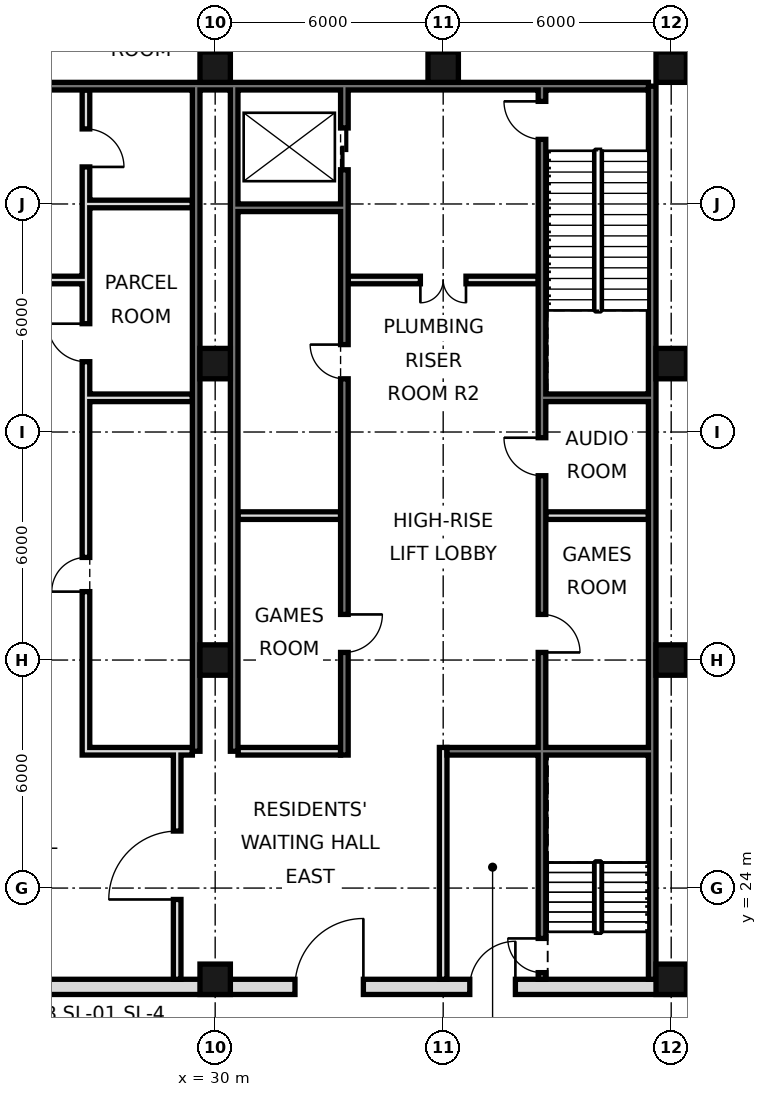
"""IFC4 building model, lengths in metres.
Left out: names, types, materials, properties, quantities, classifications, styles, units other than length and angle.
Written with IfcOpenShell. Run it as: python <this file> out.ifc"""

import sys

from ifc_helpers import new_model, si_unit, direction, frame, frame_2d, origin, origin_2d, place, context, subcontext, project, spatial, rectangle, hollow_rectangle, extrude, element, fill, save


model = new_model("IFC4")
c1 = context("Model", 3, precision=1e-05, world=origin(), true_north=direction((0.0, 1.0)))
c2 = subcontext(c1, "Body", "Model", "MODEL_VIEW")
j1 = project(units=[si_unit("LENGTHUNIT", "METRE"), si_unit("PLANEANGLEUNIT", "RADIAN")], contexts=[c1])
p1 = place(None, origin())
s1 = spatial("IfcSite", under=j1, at=p1, CompositionType="ELEMENT")
p2 = place(p1, origin())
s2 = spatial("IfcBuilding", under=s1, at=p2, CompositionType="ELEMENT")
p3 = place(p2, frame((0.0, 0.0, 15.0)))
s3 = spatial("IfcBuildingStorey", under=s2, at=p3, CompositionType="ELEMENT", Elevation=15.0)
for number, where, z_axis, x_axis in (
    (1, (30.0, 21.6, 0.0), (0.0, 0.0, 1.0), (1.0, 0.0, 0.0)),
    (2, (30.0, 30.0, 0.0), (0.0, 0.0, 1.0), (1.0, 0.0, 0.0)),
    (3, (30.0, 37.8, 0.0), (0.0, 0.0, 1.0), (1.0, 0.0, 0.0)),
    (4, (30.0, 45.6, 0.0), (0.0, 0.0, 1.0), (1.0, 0.0, 0.0)),
    (5, (36.0, 45.6, 0.0), (0.0, 0.0, 1.0), (1.0, 0.0, 0.0)),
    (6, (42.0, 21.6, 0.0), (0.0, 0.0, 1.0), (1.0, 0.0, 0.0)),
    (7, (42.0, 30.0, 0.0), (0.0, 0.0, 1.0), (1.0, 0.0, 0.0)),
    (8, (42.0, 37.8, 0.0), (0.0, 0.0, 1.0), (1.0, 0.0, 0.0)),
    (9, (42.0, 45.6, 0.0), (0.0, 0.0, 1.0), (1.0, 0.0, 0.0)),
):
    element("IfcColumn", number, at=place(p3, frame(where, z_axis=z_axis, x_axis=x_axis)), inside=s3, PredefinedType="COLUMN", context=c2, shape_type="SweptSolid", body=[
        extrude(hollow_rectangle(XDim=0.8, YDim=0.8, WallThickness=0.07, at=origin_2d()), origin(), (0.0, 0.0, 1.0), 5.4),
    ])
p4 = place(p3, frame((41.5, 21.6, 0.0), z_axis=(0.0, 0.0, 1.0), x_axis=(0.0, 1.0, 0.0)))
e10 = element("IfcWall", 10, at=p4, inside=s3, PredefinedType="SOLIDWALL", context=c2, shape_type="SweptSolid", body=[
    extrude(rectangle(XDim=23.5, YDim=0.2, at=frame_2d((11.75, 0.0))), origin(), (0.0, 0.0, 1.0), 5.0),
])
p5 = place(p3, frame((6.6, 45.1, 0.0), z_axis=(0.0, 0.0, 1.0), x_axis=(1.0, 0.0, 0.0)))
e11 = element("IfcWall", 11, at=p5, inside=s3, PredefinedType="SOLIDWALL", context=c2, shape_type="SweptSolid", body=[
    extrude(rectangle(XDim=34.8, YDim=0.2, at=frame_2d((17.4, 0.0))), origin(), (0.0, 0.0, 1.0), 5.0),
])
for number, where, z_axis, x_axis in (
    (12, (29.5, 27.6, 0.0), (0.0, 0.0, 1.0), (0.0, 1.0, 0.0)),
    (13, (30.5, 27.6, 0.0), (0.0, 0.0, 1.0), (0.0, 1.0, 0.0)),
):
    element("IfcWall", number, at=place(p3, frame(where, z_axis=z_axis, x_axis=x_axis)), inside=s3, PredefinedType="SOLIDWALL", context=c2, shape_type="SweptSolid", body=[
        extrude(rectangle(XDim=17.5, YDim=0.2, at=frame_2d((8.75, 0.0))), origin(), (0.0, 0.0, 1.0), 5.0),
    ])
p6 = place(p3, frame((5.6, 21.4, 0.0), z_axis=(0.0, 0.0, 1.0), x_axis=(1.0, 0.0, 0.0)))
e14 = element("IfcWall", 14, at=p6, inside=s3, PredefinedType="SOLIDWALL", context=c2, shape_type="SweptSolid", body=[
    extrude(rectangle(XDim=36.8, YDim=0.4, at=frame_2d((18.4, 0.0))), origin(), (0.0, 0.0, 1.0), 3.2),
])
p7 = place(p6, frame((8.5, 0.0, 0.0)))
e15 = element("IfcOpeningElement", 15, at=p7, cuts=e14, PredefinedType="OPENING", context=c2, shape_type="SweptSolid", body=[
    extrude(rectangle(XDim=1.8, YDim=2.1, at=frame_2d((0.9, 1.05))), frame((0.0, 0.21, 0.0), z_axis=(0.0, -1.0, 0.0), x_axis=(1.0, 0.0, 0.0)), (0.0, 0.0, 1.0), 0.42),
])
p8 = place(p6, frame((17.5, 0.0, 0.0)))
e16 = element("IfcOpeningElement", 16, at=p8, cuts=e14, PredefinedType="OPENING", context=c2, shape_type="SweptSolid", body=[
    extrude(rectangle(XDim=1.8, YDim=2.1, at=frame_2d((0.9, 1.05))), frame((0.0, 0.21, 0.0), z_axis=(0.0, -1.0, 0.0), x_axis=(1.0, 0.0, 0.0)), (0.0, 0.0, 1.0), 0.42),
])
p9 = place(p6, frame((26.5, 0.0, 0.0)))
e17 = element("IfcOpeningElement", 17, at=p9, cuts=e14, PredefinedType="OPENING", context=c2, shape_type="SweptSolid", body=[
    extrude(rectangle(XDim=1.8, YDim=2.1, at=frame_2d((0.9, 1.05))), frame((0.0, 0.21, 0.0), z_axis=(0.0, -1.0, 0.0), x_axis=(1.0, 0.0, 0.0)), (0.0, 0.0, 1.0), 0.42),
])
p10 = place(p6, frame((4.5, 0.0, 0.0)))
e18 = element("IfcOpeningElement", 18, at=p10, cuts=e14, PredefinedType="OPENING", context=c2, shape_type="SweptSolid", body=[
    extrude(rectangle(XDim=1.2, YDim=2.1, at=frame_2d((0.6, 1.05))), frame((0.0, 0.21, 0.0), z_axis=(0.0, -1.0, 0.0), x_axis=(1.0, 0.0, 0.0)), (0.0, 0.0, 1.0), 0.42),
])
p11 = place(p6, frame((31.1, 0.0, 0.0)))
e19 = element("IfcOpeningElement", 19, at=p11, cuts=e14, PredefinedType="OPENING", context=c2, shape_type="SweptSolid", body=[
    extrude(rectangle(XDim=1.2, YDim=2.1, at=frame_2d((0.6, 1.05))), frame((0.0, 0.21, 0.0), z_axis=(0.0, -1.0, 0.0), x_axis=(1.0, 0.0, 0.0)), (0.0, 0.0, 1.0), 0.42),
])
p12 = place(p3, frame((29.0, 21.6, 0.0), z_axis=(0.0, 0.0, 1.0), x_axis=(0.0, 1.0, 0.0)))
e20 = element("IfcWall", 20, at=p12, inside=s3, PredefinedType="PARTITIONING", context=c2, shape_type="SweptSolid", body=[
    extrude(rectangle(XDim=6.0, YDim=0.2, at=frame_2d((3.0, 0.0))), origin(), (0.0, 0.0, 1.0), 3.2),
])
p13 = place(p12, frame((2.1, 0.0, 0.0)))
e21 = element("IfcOpeningElement", 21, at=p13, cuts=e20, PredefinedType="OPENING", context=c2, shape_type="SweptSolid", body=[
    extrude(rectangle(XDim=1.8, YDim=2.1, at=frame_2d((0.9, 1.05))), frame((0.0, 0.11, 0.0), z_axis=(0.0, -1.0, 0.0), x_axis=(1.0, 0.0, 0.0)), (0.0, 0.0, 1.0), 0.22),
])
p14 = place(p3, frame((26.6, 27.5, 0.0), z_axis=(0.0, 0.0, 1.0), x_axis=(0.0, 1.0, 0.0)))
e22 = element("IfcWall", 22, at=p14, inside=s3, PredefinedType="SOLIDWALL", context=c2, shape_type="SweptSolid", body=[
    extrude(rectangle(XDim=17.5, YDim=0.2, at=frame_2d((8.75, 0.0))), origin(), (0.0, 0.0, 1.0), 5.0),
])
p15 = place(p14, frame((4.3, 0.0, 0.0)))
e23 = element("IfcOpeningElement", 23, at=p15, cuts=e22, PredefinedType="OPENING", context=c2, shape_type="SweptSolid", body=[
    extrude(rectangle(XDim=0.9, YDim=2.1, at=frame_2d((0.45, 1.05))), frame((0.0, 0.11, 0.0), z_axis=(0.0, -1.0, 0.0), x_axis=(1.0, 0.0, 0.0)), (0.0, 0.0, 1.0), 0.22),
])
p16 = place(p14, frame((10.35, 0.0, 0.0)))
e24 = element("IfcOpeningElement", 24, at=p16, cuts=e22, PredefinedType="OPENING", context=c2, shape_type="SweptSolid", body=[
    extrude(rectangle(XDim=1.0, YDim=2.1, at=frame_2d((0.5, 1.05))), frame((0.0, 0.11, 0.0), z_axis=(0.0, -1.0, 0.0), x_axis=(1.0, 0.0, 0.0)), (0.0, 0.0, 1.0), 0.22),
])
p17 = place(p14, frame((15.475, 0.0, 0.0)))
e25 = element("IfcOpeningElement", 25, at=p17, cuts=e22, PredefinedType="OPENING", context=c2, shape_type="SweptSolid", body=[
    extrude(rectangle(XDim=1.0, YDim=2.1, at=frame_2d((0.5, 1.05))), frame((0.0, 0.11, 0.0), z_axis=(0.0, -1.0, 0.0), x_axis=(1.0, 0.0, 0.0)), (0.0, 0.0, 1.0), 0.22),
])
p18 = place(p3, frame((33.4, 27.5, 0.0), z_axis=(0.0, 0.0, 1.0), x_axis=(0.0, 1.0, 0.0)))
e26 = element("IfcWall", 26, at=p18, inside=s3, PredefinedType="SOLIDWALL", context=c2, shape_type="SweptSolid", body=[
    extrude(rectangle(XDim=17.5, YDim=0.2, at=frame_2d((8.75, 0.0))), origin(), (0.0, 0.0, 1.0), 3.2),
])
p19 = place(p18, frame((15.4, 0.0, 0.0)))
e27 = element("IfcOpeningElement", 27, at=p19, cuts=e26, PredefinedType="OPENING", context=c2, shape_type="SweptSolid", body=[
    extrude(rectangle(XDim=1.1, YDim=2.1, at=frame_2d((0.55, 1.05))), frame((0.0, 0.11, 0.0), z_axis=(0.0, -1.0, 0.0), x_axis=(1.0, 0.0, 0.0)), (0.0, 0.0, 1.0), 0.22),
])
p20 = place(p18, frame((2.7, 0.0, 0.0)))
e28 = element("IfcOpeningElement", 28, at=p20, cuts=e26, PredefinedType="OPENING", context=c2, shape_type="SweptSolid", body=[
    extrude(rectangle(XDim=1.0, YDim=2.1, at=frame_2d((0.5, 1.05))), frame((0.0, 0.11, 0.0), z_axis=(0.0, -1.0, 0.0), x_axis=(1.0, 0.0, 0.0)), (0.0, 0.0, 1.0), 0.22),
])
p21 = place(p18, frame((9.9, 0.0, 0.0)))
e29 = element("IfcOpeningElement", 29, at=p21, cuts=e26, PredefinedType="OPENING", context=c2, shape_type="SweptSolid", body=[
    extrude(rectangle(XDim=0.9, YDim=2.1, at=frame_2d((0.45, 1.05))), frame((0.0, 0.11, 0.0), z_axis=(0.0, -1.0, 0.0), x_axis=(1.0, 0.0, 0.0)), (0.0, 0.0, 1.0), 0.22),
])
p22 = place(p3, frame((36.0, 21.6, 0.0), z_axis=(0.0, 0.0, 1.0), x_axis=(0.0, 1.0, 0.0)))
e30 = element("IfcWall", 30, at=p22, inside=s3, PredefinedType="PARTITIONING", context=c2, shape_type="SweptSolid", body=[
    extrude(rectangle(XDim=6.1, YDim=0.2, at=frame_2d((3.05, 0.0))), origin(), (0.0, 0.0, 1.0), 3.2),
])
p23 = place(p3, frame((38.6, 21.6, 0.0), z_axis=(0.0, 0.0, 1.0), x_axis=(0.0, 1.0, 0.0)))
e31 = element("IfcWall", 31, at=p23, inside=s3, PredefinedType="SOLIDWALL", context=c2, shape_type="SweptSolid", body=[
    extrude(rectangle(XDim=23.4, YDim=0.2, at=frame_2d((11.7, 0.0))), origin(), (0.0, 0.0, 1.0), 3.2),
])
p24 = place(p23, frame((8.6, 0.0, 0.0)))
e32 = element("IfcOpeningElement", 32, at=p24, cuts=e31, PredefinedType="OPENING", context=c2, shape_type="SweptSolid", body=[
    extrude(rectangle(XDim=1.0, YDim=2.1, at=frame_2d((0.5, 1.05))), frame((0.0, 0.11, 0.0), z_axis=(0.0, -1.0, 0.0), x_axis=(1.0, 0.0, 0.0)), (0.0, 0.0, 1.0), 0.22),
])
p25 = place(p23, frame((13.25, 0.0, 0.0)))
e33 = element("IfcOpeningElement", 33, at=p25, cuts=e31, PredefinedType="OPENING", context=c2, shape_type="SweptSolid", body=[
    extrude(rectangle(XDim=1.0, YDim=2.1, at=frame_2d((0.5, 1.05))), frame((0.0, 0.11, 0.0), z_axis=(0.0, -1.0, 0.0), x_axis=(1.0, 0.0, 0.0)), (0.0, 0.0, 1.0), 0.22),
])
p26 = place(p23, frame((22.1, 0.0, 0.0)))
e34 = element("IfcOpeningElement", 34, at=p26, cuts=e31, PredefinedType="OPENING", context=c2, shape_type="SweptSolid", body=[
    extrude(rectangle(XDim=1.0, YDim=2.1, at=frame_2d((0.5, 1.05))), frame((0.0, 0.11, 0.0), z_axis=(0.0, -1.0, 0.0), x_axis=(1.0, 0.0, 0.0)), (0.0, 0.0, 1.0), 0.22),
])
p27 = place(p23, frame((0.175, 0.0, 0.0)))
e35 = element("IfcOpeningElement", 35, at=p27, cuts=e31, PredefinedType="OPENING", context=c2, shape_type="SweptSolid", body=[
    extrude(rectangle(XDim=0.9, YDim=2.1, at=frame_2d((0.45, 1.05))), frame((0.0, 0.11, 0.0), z_axis=(0.0, -1.0, 0.0), x_axis=(1.0, 0.0, 0.0)), (0.0, 0.0, 1.0), 0.22),
])
p28 = place(p3, frame((26.7, 27.6, 0.0), z_axis=(0.0, 0.0, 1.0), x_axis=(1.0, 0.0, 0.0)))
e36 = element("IfcWall", 36, at=p28, inside=s3, PredefinedType="SOLIDWALL", context=c2, shape_type="SweptSolid", body=[
    extrude(rectangle(XDim=2.7, YDim=0.2, at=frame_2d((1.35, 0.0))), origin(), (0.0, 0.0, 1.0), 5.0),
])
p29 = place(p3, frame((30.6, 27.6, 0.0), z_axis=(0.0, 0.0, 1.0), x_axis=(1.0, 0.0, 0.0)))
e37 = element("IfcWall", 37, at=p29, inside=s3, PredefinedType="PARTITIONING", context=c2, shape_type="SweptSolid", body=[
    extrude(rectangle(XDim=2.7, YDim=0.2, at=frame_2d((1.35, 0.0))), origin(), (0.0, 0.0, 1.0), 5.0),
])
p30 = place(p3, frame((36.1, 27.6, 0.0), z_axis=(0.0, 0.0, 1.0), x_axis=(1.0, 0.0, 0.0)))
e38 = element("IfcWall", 38, at=p30, inside=s3, PredefinedType="SOLIDWALL", context=c2, shape_type="SweptSolid", body=[
    extrude(rectangle(XDim=5.3, YDim=0.2, at=frame_2d((2.65, 0.0))), origin(), (0.0, 0.0, 1.0), 5.0),
])
p31 = place(p3, frame((30.6, 33.8, 0.0), z_axis=(0.0, 0.0, 1.0), x_axis=(1.0, 0.0, 0.0)))
e39 = element("IfcWall", 39, at=p31, inside=s3, PredefinedType="SOLIDWALL", context=c2, shape_type="SweptSolid", body=[
    extrude(rectangle(XDim=2.7, YDim=0.2, at=frame_2d((1.35, 0.0))), origin(), (0.0, 0.0, 1.0), 5.0),
])
p32 = place(p3, frame((38.7, 33.8, 0.0), z_axis=(0.0, 0.0, 1.0), x_axis=(1.0, 0.0, 0.0)))
e40 = element("IfcWall", 40, at=p32, inside=s3, PredefinedType="PARTITIONING", context=c2, shape_type="SweptSolid", body=[
    extrude(rectangle(XDim=2.7, YDim=0.2, at=frame_2d((1.35, 0.0))), origin(), (0.0, 0.0, 1.0), 5.0),
])
for number, where, z_axis, x_axis in (
    (41, (26.7, 36.9, 0.0), (0.0, 0.0, 1.0), (1.0, 0.0, 0.0)),
    (42, (38.7, 36.9, 0.0), (0.0, 0.0, 1.0), (1.0, 0.0, 0.0)),
):
    element("IfcWall", number, at=place(p3, frame(where, z_axis=z_axis, x_axis=x_axis)), inside=s3, PredefinedType="SOLIDWALL", context=c2, shape_type="SweptSolid", body=[
        extrude(rectangle(XDim=2.7, YDim=0.2, at=frame_2d((1.35, 0.0))), origin(), (0.0, 0.0, 1.0), 5.0),
    ])
p33 = place(p3, frame((21.5, 40.0, 0.0), z_axis=(0.0, 0.0, 1.0), x_axis=(1.0, 0.0, 0.0)))
e43 = element("IfcWall", 43, at=p33, inside=s3, PredefinedType="PARTITIONING", context=c2, shape_type="SweptSolid", body=[
    extrude(rectangle(XDim=5.0, YDim=0.2, at=frame_2d((2.5, 0.0))), origin(), (0.0, 0.0, 1.0), 5.0),
])
p34 = place(p33, frame((1.9, 0.0, 0.0)))
e44 = element("IfcOpeningElement", 44, at=p34, cuts=e43, PredefinedType="OPENING", context=c2, shape_type="SweptSolid", body=[
    extrude(rectangle(XDim=1.2, YDim=2.1, at=frame_2d((0.6, 1.05))), frame((0.0, 0.11, 0.0), z_axis=(0.0, -1.0, 0.0), x_axis=(1.0, 0.0, 0.0)), (0.0, 0.0, 1.0), 0.22),
])
p35 = place(p3, frame((33.5, 40.0, 0.0), z_axis=(0.0, 0.0, 1.0), x_axis=(1.0, 0.0, 0.0)))
e45 = element("IfcWall", 45, at=p35, inside=s3, PredefinedType="PARTITIONING", context=c2, shape_type="SweptSolid", body=[
    extrude(rectangle(XDim=5.0, YDim=0.2, at=frame_2d((2.5, 0.0))), origin(), (0.0, 0.0, 1.0), 5.0),
])
p36 = place(p35, frame((1.9, 0.0, 0.0)))
e46 = element("IfcOpeningElement", 46, at=p36, cuts=e45, PredefinedType="OPENING", context=c2, shape_type="SweptSolid", body=[
    extrude(rectangle(XDim=1.2, YDim=2.1, at=frame_2d((0.6, 1.05))), frame((0.0, 0.11, 0.0), z_axis=(0.0, -1.0, 0.0), x_axis=(1.0, 0.0, 0.0)), (0.0, 0.0, 1.0), 0.22),
])
p37 = place(p3, frame((30.6, 41.9, 0.0), z_axis=(0.0, 0.0, 1.0), x_axis=(1.0, 0.0, 0.0)))
e47 = element("IfcWall", 47, at=p37, inside=s3, PredefinedType="SOLIDWALL", context=c2, shape_type="SweptSolid", body=[
    extrude(rectangle(XDim=2.7, YDim=0.2, at=frame_2d((1.35, 0.0))), origin(), (0.0, 0.0, 1.0), 5.0),
])
p38 = place(p3, frame((26.7, 42.0, 0.0), z_axis=(0.0, 0.0, 1.0), x_axis=(1.0, 0.0, 0.0)))
e48 = element("IfcWall", 48, at=p38, inside=s3, PredefinedType="PARTITIONING", context=c2, shape_type="SweptSolid", body=[
    extrude(rectangle(XDim=2.7, YDim=0.2, at=frame_2d((1.35, 0.0))), origin(), (0.0, 0.0, 1.0), 5.0),
])
p39 = place(p13, origin())
e49 = element("IfcDoor", 49, at=p39, inside=s3, OperationType="SINGLE_SWING_LEFT", PredefinedType="DOOR", context=c2, shape_type="SweptSolid", body=[
    extrude(rectangle(XDim=1.8, YDim=2.1, at=frame_2d((0.9, 1.05))), frame((0.0, 0.025, 0.0), z_axis=(0.0, -1.0, 0.0), x_axis=(1.0, 0.0, 0.0)), (0.0, 0.0, 1.0), 0.05),
])
fill(e21, e49)
p40 = place(p9, frame((1.8, 0.0, 0.0), z_axis=(0.0, 0.0, 1.0), x_axis=(-1.0, 0.0, 0.0)))
e50 = element("IfcDoor", 50, at=p40, inside=s3, OperationType="SINGLE_SWING_LEFT", PredefinedType="DOOR", context=c2, shape_type="SweptSolid", body=[
    extrude(rectangle(XDim=1.8, YDim=2.1, at=frame_2d((0.9, 1.05))), frame((0.0, 0.025, 0.0), z_axis=(0.0, -1.0, 0.0), x_axis=(1.0, 0.0, 0.0)), (0.0, 0.0, 1.0), 0.05),
])
fill(e17, e50)
p41 = place(p11, frame((1.2, 0.0, 0.0), z_axis=(0.0, 0.0, 1.0), x_axis=(-1.0, 0.0, 0.0)))
e51 = element("IfcDoor", 51, at=p41, inside=s3, OperationType="SINGLE_SWING_LEFT", PredefinedType="DOOR", context=c2, shape_type="SweptSolid", body=[
    extrude(rectangle(XDim=1.2, YDim=2.1, at=frame_2d((0.6, 1.05))), frame((0.0, 0.025, 0.0), z_axis=(0.0, -1.0, 0.0), x_axis=(1.0, 0.0, 0.0)), (0.0, 0.0, 1.0), 0.05),
])
fill(e19, e51)
p42 = place(p36, frame((1.2, 0.0, 0.0), z_axis=(0.0, 0.0, 1.0), x_axis=(-1.0, 0.0, 0.0)))
e52 = element("IfcDoor", 52, at=p42, inside=s3, OperationType="DOUBLE_DOOR_SINGLE_SWING", PredefinedType="DOOR", context=c2, shape_type="SweptSolid", body=[
    extrude(rectangle(XDim=1.2, YDim=2.1, at=frame_2d((0.6, 1.05))), frame((0.0, 0.025, 0.0), z_axis=(0.0, -1.0, 0.0), x_axis=(1.0, 0.0, 0.0)), (0.0, 0.0, 1.0), 0.05),
])
fill(e46, e52)
p43 = place(p19, origin())
e53 = element("IfcDoor", 53, at=p43, inside=s3, OperationType="DOUBLE_DOOR_SLIDING", PredefinedType="DOOR", context=c2, shape_type="SweptSolid", body=[
    extrude(rectangle(XDim=1.1, YDim=2.1, at=frame_2d((0.55, 1.05))), frame((0.0, 0.025, 0.0), z_axis=(0.0, -1.0, 0.0), x_axis=(1.0, 0.0, 0.0)), (0.0, 0.0, 1.0), 0.05),
])
fill(e27, e53)
p44 = place(p24, frame((1.0, 0.0, 0.0), z_axis=(0.0, 0.0, 1.0), x_axis=(-1.0, 0.0, 0.0)))
e54 = element("IfcDoor", 54, at=p44, inside=s3, OperationType="SINGLE_SWING_RIGHT", PredefinedType="DOOR", context=c2, shape_type="SweptSolid", body=[
    extrude(rectangle(XDim=1.0, YDim=2.1, at=frame_2d((0.5, 1.05))), frame((0.0, 0.025, 0.0), z_axis=(0.0, -1.0, 0.0), x_axis=(1.0, 0.0, 0.0)), (0.0, 0.0, 1.0), 0.05),
])
fill(e32, e54)
p45 = place(p25, frame((1.0, 0.0, 0.0), z_axis=(0.0, 0.0, 1.0), x_axis=(-1.0, 0.0, 0.0)))
e55 = element("IfcDoor", 55, at=p45, inside=s3, OperationType="SINGLE_SWING_LEFT", PredefinedType="DOOR", context=c2, shape_type="SweptSolid", body=[
    extrude(rectangle(XDim=1.0, YDim=2.1, at=frame_2d((0.5, 1.05))), frame((0.0, 0.025, 0.0), z_axis=(0.0, -1.0, 0.0), x_axis=(1.0, 0.0, 0.0)), (0.0, 0.0, 1.0), 0.05),
])
fill(e33, e55)
p46 = place(p20, origin())
e56 = element("IfcDoor", 56, at=p46, inside=s3, OperationType="SINGLE_SWING_RIGHT", PredefinedType="DOOR", context=c2, shape_type="SweptSolid", body=[
    extrude(rectangle(XDim=1.0, YDim=2.1, at=frame_2d((0.5, 1.05))), frame((0.0, 0.025, 0.0), z_axis=(0.0, -1.0, 0.0), x_axis=(1.0, 0.0, 0.0)), (0.0, 0.0, 1.0), 0.05),
])
fill(e28, e56)
p47 = place(p26, frame((1.0, 0.0, 0.0), z_axis=(0.0, 0.0, 1.0), x_axis=(-1.0, 0.0, 0.0)))
e57 = element("IfcDoor", 57, at=p47, inside=s3, OperationType="SINGLE_SWING_LEFT", PredefinedType="DOOR", context=c2, shape_type="SweptSolid", body=[
    extrude(rectangle(XDim=1.0, YDim=2.1, at=frame_2d((0.5, 1.05))), frame((0.0, 0.025, 0.0), z_axis=(0.0, -1.0, 0.0), x_axis=(1.0, 0.0, 0.0)), (0.0, 0.0, 1.0), 0.05),
])
fill(e34, e57)
p48 = place(p27, frame((0.9, 0.0, 0.0), z_axis=(0.0, 0.0, 1.0), x_axis=(-1.0, 0.0, 0.0)))
e58 = element("IfcDoor", 58, at=p48, inside=s3, OperationType="SINGLE_SWING_LEFT", PredefinedType="DOOR", context=c2, shape_type="SweptSolid", body=[
    extrude(rectangle(XDim=0.9, YDim=2.1, at=frame_2d((0.45, 1.05))), frame((0.0, 0.025, 0.0), z_axis=(0.0, -1.0, 0.0), x_axis=(1.0, 0.0, 0.0)), (0.0, 0.0, 1.0), 0.05),
])
fill(e35, e58)
p49 = place(p21, frame((0.9, 0.0, 0.0), z_axis=(0.0, 0.0, 1.0), x_axis=(-1.0, 0.0, 0.0)))
e59 = element("IfcDoor", 59, at=p49, inside=s3, OperationType="SINGLE_SWING_LEFT", PredefinedType="DOOR", context=c2, shape_type="SweptSolid", body=[
    extrude(rectangle(XDim=0.9, YDim=2.1, at=frame_2d((0.45, 1.05))), frame((0.0, 0.025, 0.0), z_axis=(0.0, -1.0, 0.0), x_axis=(1.0, 0.0, 0.0)), (0.0, 0.0, 1.0), 0.05),
])
fill(e29, e59)
p50 = place(p15, origin())
e60 = element("IfcDoor", 60, at=p50, inside=s3, OperationType="SINGLE_SWING_LEFT", PredefinedType="DOOR", context=c2, shape_type="SweptSolid", body=[
    extrude(rectangle(XDim=0.9, YDim=2.1, at=frame_2d((0.45, 1.05))), frame((0.0, 0.025, 0.0), z_axis=(0.0, -1.0, 0.0), x_axis=(1.0, 0.0, 0.0)), (0.0, 0.0, 1.0), 0.05),
])
fill(e23, e60)
p51 = place(p16, frame((1.0, 0.0, 0.0), z_axis=(0.0, 0.0, 1.0), x_axis=(-1.0, 0.0, 0.0)))
e61 = element("IfcDoor", 61, at=p51, inside=s3, OperationType="SINGLE_SWING_LEFT", PredefinedType="DOOR", context=c2, shape_type="SweptSolid", body=[
    extrude(rectangle(XDim=1.0, YDim=2.1, at=frame_2d((0.5, 1.05))), frame((0.0, 0.025, 0.0), z_axis=(0.0, -1.0, 0.0), x_axis=(1.0, 0.0, 0.0)), (0.0, 0.0, 1.0), 0.05),
])
fill(e24, e61)
p52 = place(p17, frame((1.0, 0.0, 0.0), z_axis=(0.0, 0.0, 1.0), x_axis=(-1.0, 0.0, 0.0)))
e62 = element("IfcDoor", 62, at=p52, inside=s3, OperationType="SINGLE_SWING_RIGHT", PredefinedType="DOOR", context=c2, shape_type="SweptSolid", body=[
    extrude(rectangle(XDim=1.0, YDim=2.1, at=frame_2d((0.5, 1.05))), frame((0.0, 0.025, 0.0), z_axis=(0.0, -1.0, 0.0), x_axis=(1.0, 0.0, 0.0)), (0.0, 0.0, 1.0), 0.05),
])
fill(e25, e62)
save(model, sys.argv[1])
